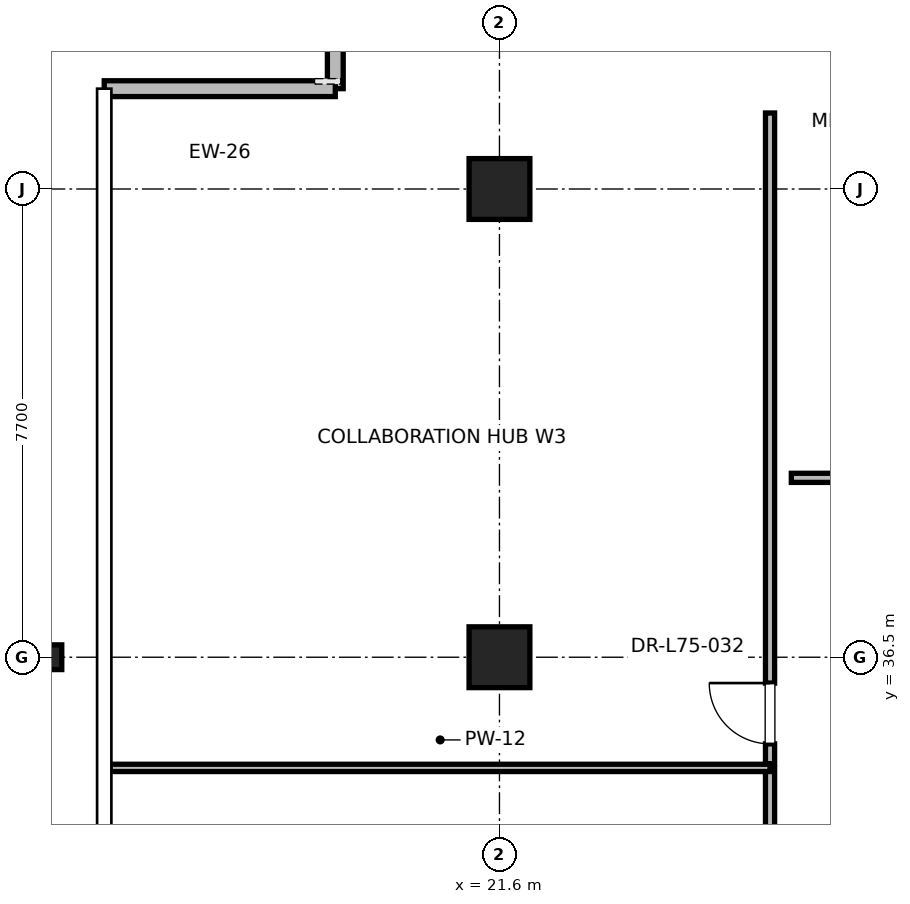
"""IFC4 building model, lengths in metres.
Left out: names, types, materials, properties, quantities, classifications, styles, units other than length and angle.
Written with IfcOpenShell. Run it as: python <this file> out.ifc"""

import sys

from ifc_helpers import new_model, si_unit, direction, frame, frame_2d, origin, origin_2d, place, context, subcontext, project, spatial, rectangle, i_section, extrude, element, fill, save


model = new_model("IFC4")
c1 = context("Model", 3, precision=1e-05, world=origin(), true_north=direction((0.0, 1.0)))
c2 = subcontext(c1, "Body", "Model", "MODEL_VIEW")
j1 = project(units=[si_unit("LENGTHUNIT", "METRE"), si_unit("PLANEANGLEUNIT", "RADIAN")], contexts=[c1])
p1 = place(None, origin())
s1 = spatial("IfcSite", under=j1, at=p1, CompositionType="ELEMENT")
p2 = place(p1, origin())
s2 = spatial("IfcBuilding", under=s1, at=p2, CompositionType="ELEMENT")
p3 = place(p2, frame((0.0, 0.0, 322.8)))
s3 = spatial("IfcBuildingStorey", under=s2, at=p3, CompositionType="ELEMENT", Elevation=322.8)
for number, where, z_axis, x_axis in (
    (1, (21.6, 36.5, 0.0), (0.0, 0.0, 1.0), (1.0, 0.0, 0.0)),
    (2, (21.6, 44.2, 0.0), (0.0, 0.0, 1.0), (1.0, 0.0, 0.0)),
):
    element("IfcColumn", number, at=place(p3, frame(where, z_axis=z_axis, x_axis=x_axis)), inside=s3, PredefinedType="COLUMN", context=c2, shape_type="SweptSolid", body=[
        extrude(rectangle(XDim=1.0, YDim=1.0, at=origin_2d()), origin(), (0.0, 0.0, 1.0), 4.0),
    ])
p4 = place(p3, frame((14.2, 36.5, 0.0), z_axis=(0.0, 0.0, 1.0), x_axis=(1.0, 0.0, 0.0)))
e3 = element("IfcColumn", 3, at=p4, inside=s3, PredefinedType="COLUMN", context=c2, shape_type="SweptSolid", body=[
    extrude(i_section(OverallWidth=0.403, OverallDepth=0.406, WebThickness=0.027, FlangeThickness=0.043, FilletRadius=0.015, at=origin_2d()), origin(), (0.0, 0.0, 1.0), 4.0),
])
p5 = place(p3, frame((18.9, 49.15, 0.0), z_axis=(0.0, 0.0, 1.0), x_axis=(0.0, -1.0, 0.0)))
e4 = element("IfcWall", 4, at=p5, inside=s3, PredefinedType="PARAPET", context=c2, shape_type="SweptSolid", body=[
    extrude(rectangle(XDim=3.3, YDim=0.26, at=frame_2d((1.65, 0.0))), origin(), (0.0, 0.0, 1.0), 3.785),
])
p6 = place(p5, frame((0.95, 0.0, 0.85)))
e5 = element("IfcOpeningElement", 5, at=p6, cuts=e4, PredefinedType="OPENING", context=c2, shape_type="SweptSolid", body=[
    extrude(rectangle(XDim=1.4, YDim=2.0, at=frame_2d((0.7, 1.0))), frame((0.0, 0.13, 0.0), z_axis=(0.0, -1.0, 0.0), x_axis=(1.0, 0.0, 0.0)), (0.0, 0.0, 1.0), 0.26),
])
p7 = place(p3, frame((18.9, 45.85, 0.0), z_axis=(0.0, 0.0, 1.0), x_axis=(-1.0, 0.0, 0.0)))
e6 = element("IfcWall", 6, at=p7, inside=s3, PredefinedType="PARAPET", context=c2, shape_type="SweptSolid", body=[
    extrude(rectangle(XDim=3.8, YDim=0.26, at=frame_2d((1.9, 0.0))), origin(), (0.0, 0.0, 1.0), 3.785),
])
p8 = place(p3, frame((26.4, 39.45, 0.0), z_axis=(0.0, 0.0, 1.0), x_axis=(1.0, 0.0, 0.0)))
e7 = element("IfcWall", 7, at=p8, inside=s3, PredefinedType="PARTITIONING", context=c2, shape_type="SweptSolid", body=[
    extrude(rectangle(XDim=3.808, YDim=0.15, at=frame_2d((1.904, 0.0))), origin(), (0.0, 0.0, 1.0), 2.85),
])
p9 = place(p8, frame((1.419, 0.0, 0.0)))
e8 = element("IfcOpeningElement", 8, at=p9, cuts=e7, PredefinedType="OPENING", context=c2, shape_type="SweptSolid", body=[
    extrude(rectangle(XDim=1.0, YDim=2.15, at=frame_2d((0.5, 1.075))), frame((0.0, 0.075, 0.0), z_axis=(0.0, -1.0, 0.0), x_axis=(1.0, 0.0, 0.0)), (0.0, 0.0, 1.0), 0.15),
])
p10 = place(p3, frame((26.05, 22.185, 0.0), z_axis=(0.0, 0.0, 1.0), x_axis=(0.0, 1.0, 0.0)))
e9 = element("IfcWall", 9, at=p10, inside=s3, PredefinedType="PARTITIONING", context=c2, shape_type="SweptSolid", body=[
    extrude(rectangle(XDim=12.495, YDim=0.15, at=frame_2d((6.248, 0.0))), origin(), (0.0, 0.0, 1.0), 2.85),
])
p11 = place(p10, frame((5.712, 0.0, 0.0)))
e10 = element("IfcOpeningElement", 10, at=p11, cuts=e9, PredefinedType="OPENING", context=c2, shape_type="SweptSolid", body=[
    extrude(rectangle(XDim=1.0, YDim=2.15, at=frame_2d((0.5, 1.075))), frame((0.0, 0.075, 0.0), z_axis=(0.0, -1.0, 0.0), x_axis=(1.0, 0.0, 0.0)), (0.0, 0.0, 1.0), 0.15),
])
p12 = place(p3, frame((15.2, 34.68, 0.0), z_axis=(0.0, 0.0, 1.0), x_axis=(1.0, 0.0, 0.0)))
e11 = element("IfcWall", 11, at=p12, inside=s3, PredefinedType="PARTITIONING", context=c2, shape_type="SweptSolid", body=[
    extrude(rectangle(XDim=10.85, YDim=0.12, at=frame_2d((5.425, 0.0))), origin(), (0.0, 0.0, 1.0), 2.85),
])
p13 = place(p3, frame((26.05, 34.75, 0.0), z_axis=(0.0, 0.0, 1.0), x_axis=(0.0, 1.0, 0.0)))
e12 = element("IfcWall", 12, at=p13, inside=s3, PredefinedType="PARTITIONING", context=c2, shape_type="SweptSolid", body=[
    extrude(rectangle(XDim=10.7, YDim=0.15, at=frame_2d((5.35, 0.0))), origin(), (0.0, 0.0, 1.0), 2.85),
])
p14 = place(p13, frame((0.325, 0.0, 0.0)))
e13 = element("IfcOpeningElement", 13, at=p14, cuts=e12, PredefinedType="OPENING", context=c2, shape_type="SweptSolid", body=[
    extrude(rectangle(XDim=1.0, YDim=2.15, at=frame_2d((0.5, 1.075))), frame((0.0, 0.075, 0.0), z_axis=(0.0, -1.0, 0.0), x_axis=(1.0, 0.0, 0.0)), (0.0, 0.0, 1.0), 0.15),
])
p15 = place(p14, origin())
e14 = element("IfcDoor", 14, at=p15, inside=s3, OperationType="SINGLE_SWING_RIGHT", PredefinedType="DOOR", context=c2, shape_type="SweptSolid", body=[
    extrude(rectangle(XDim=1.0, YDim=2.15, at=frame_2d((0.5, 1.075))), frame((0.0, 0.025, 0.0), z_axis=(0.0, -1.0, 0.0), x_axis=(1.0, 0.0, 0.0)), (0.0, 0.0, 1.0), 0.05),
])
fill(e13, e14)
save(model, sys.argv[1])
